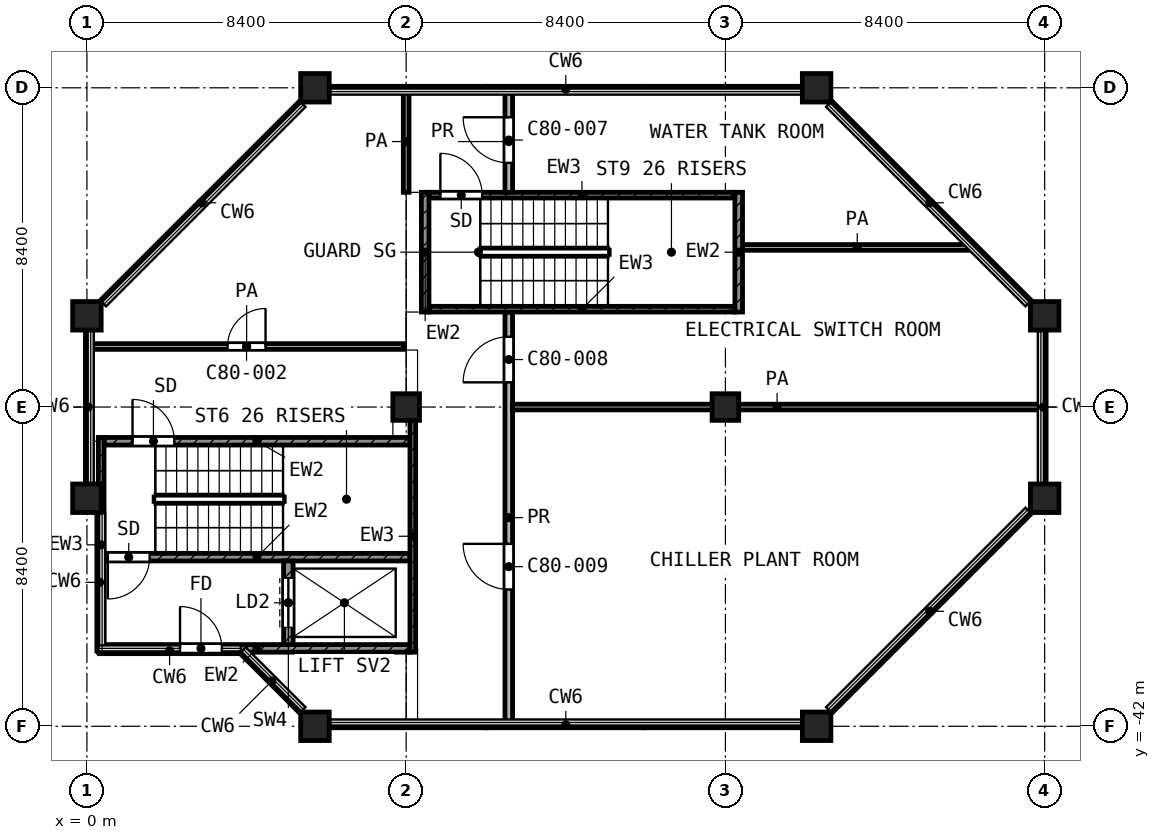
"""IFC4 building model, lengths in metres.
Left out: names, types, materials, properties, quantities, classifications, styles, units other than length and angle.
Written with IfcOpenShell. Run it as: python <this file> out.ifc"""

import sys

from ifc_helpers import new_model, si_unit, direction, frame, frame_2d, origin, origin_2d, place, context, subcontext, project, spatial, rectangle, extrude, element, fill, save


model = new_model("IFC4")
c1 = context("Model", 3, precision=1e-05, world=origin(), true_north=direction((0.0, 1.0)))
c2 = subcontext(c1, "Body", "Model", "MODEL_VIEW")
j1 = project(units=[si_unit("LENGTHUNIT", "METRE"), si_unit("PLANEANGLEUNIT", "RADIAN")], contexts=[c1])
p1 = place(None, origin())
s1 = spatial("IfcSite", under=j1, at=p1, CompositionType="ELEMENT")
p2 = place(p1, origin())
s2 = spatial("IfcBuilding", under=s1, at=p2, CompositionType="ELEMENT")
p3 = place(p2, frame((0.0, 0.0, 345.7)))
s3 = spatial("IfcBuildingStorey", under=s2, at=p3, CompositionType="ELEMENT", Elevation=345.7)
for number, where, z_axis, x_axis in (
    (1, (6.0, -25.2, 0.0), (0.0, 0.0, 1.0), (1.0, 0.0, 0.0)),
    (2, (19.2, -25.2, 0.0), (0.0, 0.0, 1.0), (1.0, 0.0, 0.0)),
    (3, (0.0, -31.2, 0.0), (0.0, 0.0, 1.0), (1.0, 0.0, 0.0)),
    (4, (25.2, -31.2, 0.0), (0.0, 0.0, 1.0), (1.0, 0.0, 0.0)),
):
    element("IfcColumn", number, at=place(p3, frame(where, z_axis=z_axis, x_axis=x_axis)), inside=s3, PredefinedType="COLUMN", context=c2, shape_type="SweptSolid", body=[
        extrude(rectangle(XDim=0.75, YDim=0.75, at=origin_2d()), origin(), (0.0, 0.0, 1.0), 4.5),
    ])
for number, where, z_axis, x_axis in (
    (5, (8.4, -33.6, 0.0), (0.0, 0.0, 1.0), (1.0, 0.0, 0.0)),
    (6, (16.8, -33.6, 0.0), (0.0, 0.0, 1.0), (1.0, 0.0, 0.0)),
):
    element("IfcColumn", number, at=place(p3, frame(where, z_axis=z_axis, x_axis=x_axis)), inside=s3, PredefinedType="COLUMN", context=c2, shape_type="SweptSolid", body=[
        extrude(rectangle(XDim=0.7, YDim=0.7, at=origin_2d()), origin(), (0.0, 0.0, 1.0), 4.5),
    ])
for number, where, z_axis, x_axis in (
    (7, (0.0, -36.0, 0.0), (0.0, 0.0, 1.0), (1.0, 0.0, 0.0)),
    (8, (25.2, -36.0, 0.0), (0.0, 0.0, 1.0), (1.0, 0.0, 0.0)),
    (9, (6.0, -42.0, 0.0), (0.0, 0.0, 1.0), (1.0, 0.0, 0.0)),
    (10, (19.2, -42.0, 0.0), (0.0, 0.0, 1.0), (1.0, 0.0, 0.0)),
):
    element("IfcColumn", number, at=place(p3, frame(where, z_axis=z_axis, x_axis=x_axis)), inside=s3, PredefinedType="COLUMN", context=c2, shape_type="SweptSolid", body=[
        extrude(rectangle(XDim=0.75, YDim=0.75, at=origin_2d()), origin(), (0.0, 0.0, 1.0), 4.5),
    ])
p4 = place(p3, frame((0.375, -40.05, 0.0), z_axis=(0.0, 0.0, 1.0), x_axis=(0.0, 1.0, 0.0)))
e11 = element("IfcWall", 11, at=p4, inside=s3, PredefinedType="SHEAR", context=c2, shape_type="SweptSolid", body=[
    extrude(rectangle(XDim=5.65, YDim=0.15, at=frame_2d((2.825, 0.0))), origin(), (0.0, 0.0, 1.0), 4.2),
])
p5 = place(p3, frame((8.575, -40.05, 0.0), z_axis=(0.0, 0.0, 1.0), x_axis=(0.0, 1.0, 0.0)))
e12 = element("IfcWall", 12, at=p5, inside=s3, PredefinedType="SHEAR", context=c2, shape_type="SweptSolid", body=[
    extrude(rectangle(XDim=6.1, YDim=0.15, at=frame_2d((3.05, 0.0))), origin(), (0.0, 0.0, 1.0), 4.2),
])
p6 = place(p3, frame((0.45, -34.5, 0.0), z_axis=(0.0, 0.0, 1.0), x_axis=(1.0, 0.0, 0.0)))
e13 = element("IfcWall", 13, at=p6, inside=s3, PredefinedType="SHEAR", context=c2, shape_type="SweptSolid", body=[
    extrude(rectangle(XDim=8.05, YDim=0.2, at=frame_2d((4.025, 0.0))), origin(), (0.0, 0.0, 1.0), 4.2),
])
p7 = place(p6, frame((0.75, 0.0, 0.0)))
e14 = element("IfcOpeningElement", 14, at=p7, cuts=e13, PredefinedType="OPENING", context=c2, shape_type="SweptSolid", body=[
    extrude(rectangle(XDim=1.1, YDim=2.1, at=frame_2d((0.55, 1.05))), frame((0.0, 0.11, 0.0), z_axis=(0.0, -1.0, 0.0), x_axis=(1.0, 0.0, 0.0)), (0.0, 0.0, 1.0), 0.22),
])
p8 = place(p3, frame((0.45, -37.55, 0.0), z_axis=(0.0, 0.0, 1.0), x_axis=(1.0, 0.0, 0.0)))
e15 = element("IfcWall", 15, at=p8, inside=s3, PredefinedType="SHEAR", context=c2, shape_type="SweptSolid", body=[
    extrude(rectangle(XDim=8.05, YDim=0.2, at=frame_2d((4.025, 0.0))), origin(), (0.0, 0.0, 1.0), 4.2),
])
p9 = place(p8, frame((0.1, 0.0, 0.0)))
e16 = element("IfcOpeningElement", 16, at=p9, cuts=e15, PredefinedType="OPENING", context=c2, shape_type="SweptSolid", body=[
    extrude(rectangle(XDim=1.1, YDim=2.1, at=frame_2d((0.55, 1.05))), frame((0.0, 0.11, 0.0), z_axis=(0.0, -1.0, 0.0), x_axis=(1.0, 0.0, 0.0)), (0.0, 0.0, 1.0), 0.22),
])
p10 = place(p3, frame((0.45, -39.95, 0.0), z_axis=(0.0, 0.0, 1.0), x_axis=(1.0, 0.0, 0.0)))
e17 = element("IfcWall", 17, at=p10, inside=s3, PredefinedType="SHEAR", context=c2, shape_type="SweptSolid", body=[
    extrude(rectangle(XDim=8.05, YDim=0.2, at=frame_2d((4.025, 0.0))), origin(), (0.0, 0.0, 1.0), 4.2),
])
p11 = place(p10, frame((2.0, 0.0, 0.0)))
e18 = element("IfcOpeningElement", 18, at=p11, cuts=e17, PredefinedType="OPENING", context=c2, shape_type="SweptSolid", body=[
    extrude(rectangle(XDim=1.1, YDim=2.1, at=frame_2d((0.55, 1.05))), frame((0.0, 0.11, 0.0), z_axis=(0.0, -1.0, 0.0), x_axis=(1.0, 0.0, 0.0)), (0.0, 0.0, 1.0), 0.22),
])
p12 = place(p3, frame((5.3, -39.85, 0.0), z_axis=(0.0, 0.0, 1.0), x_axis=(0.0, 1.0, 0.0)))
e19 = element("IfcWall", 19, at=p12, inside=s3, PredefinedType="SHEAR", context=c2, shape_type="SweptSolid", body=[
    extrude(rectangle(XDim=2.2, YDim=0.25, at=frame_2d((1.1, 0.0))), origin(), (0.0, 0.0, 1.0), 4.2),
])
p13 = place(p12, frame((0.45, 0.0, 0.0)))
e20 = element("IfcOpeningElement", 20, at=p13, cuts=e19, PredefinedType="OPENING", context=c2, shape_type="SweptSolid", body=[
    extrude(rectangle(XDim=1.3, YDim=2.1, at=frame_2d((0.65, 1.05))), frame((0.0, 0.135, 0.0), z_axis=(0.0, -1.0, 0.0), x_axis=(1.0, 0.0, 0.0)), (0.0, 0.0, 1.0), 0.27),
])
for number, where, z_axis, x_axis in (
    (21, (8.9, -31.1, 0.0), (0.0, 0.0, 1.0), (0.0, 1.0, 0.0)),
    (22, (17.15, -31.1, 0.0), (0.0, 0.0, 1.0), (0.0, 1.0, 0.0)),
):
    element("IfcWall", number, at=place(p3, frame(where, z_axis=z_axis, x_axis=x_axis)), inside=s3, PredefinedType="SHEAR", context=c2, shape_type="SweptSolid", body=[
        extrude(rectangle(XDim=3.15, YDim=0.2, at=frame_2d((1.575, 0.0))), origin(), (0.0, 0.0, 1.0), 4.2),
    ])
p14 = place(p3, frame((9.0, -28.025, 0.0), z_axis=(0.0, 0.0, 1.0), x_axis=(1.0, 0.0, 0.0)))
e23 = element("IfcWall", 23, at=p14, inside=s3, PredefinedType="SHEAR", context=c2, shape_type="SweptSolid", body=[
    extrude(rectangle(XDim=8.05, YDim=0.15, at=frame_2d((4.025, 0.0))), origin(), (0.0, 0.0, 1.0), 4.2),
])
p15 = place(p14, frame((0.3, 0.0, 0.0)))
e24 = element("IfcOpeningElement", 24, at=p15, cuts=e23, PredefinedType="OPENING", context=c2, shape_type="SweptSolid", body=[
    extrude(rectangle(XDim=1.1, YDim=2.1, at=frame_2d((0.55, 1.05))), frame((0.0, 0.085, 0.0), z_axis=(0.0, -1.0, 0.0), x_axis=(1.0, 0.0, 0.0)), (0.0, 0.0, 1.0), 0.17),
])
p16 = place(p3, frame((9.0, -31.025, 0.0), z_axis=(0.0, 0.0, 1.0), x_axis=(1.0, 0.0, 0.0)))
e25 = element("IfcWall", 25, at=p16, inside=s3, PredefinedType="SHEAR", context=c2, shape_type="SweptSolid", body=[
    extrude(rectangle(XDim=8.05, YDim=0.15, at=frame_2d((4.025, 0.0))), origin(), (0.0, 0.0, 1.0), 4.2),
])
p17 = place(p3, frame((11.2, -33.6, 0.0), z_axis=(0.0, 0.0, 1.0), x_axis=(1.0, 0.0, 0.0)))
e26 = element("IfcWall", 26, at=p17, inside=s3, PredefinedType="PARTITIONING", context=c2, shape_type="SweptSolid", body=[
    extrude(rectangle(XDim=13.92, YDim=0.15, at=frame_2d((6.96, 0.0))), origin(), (0.0, 0.0, 1.0), 4.2),
])
p18 = place(p3, frame((0.08, -32.007, 0.0), z_axis=(0.0, 0.0, 1.0), x_axis=(1.0, 0.0, 0.0)))
e27 = element("IfcWall", 27, at=p18, inside=s3, PredefinedType="PARTITIONING", context=c2, shape_type="SweptSolid", body=[
    extrude(rectangle(XDim=8.245, YDim=0.15, at=frame_2d((4.123, 0.0))), origin(), (0.0, 0.0, 1.0), 4.2),
])
p19 = place(p18, frame((3.62, 0.0, 0.0)))
e28 = element("IfcOpeningElement", 28, at=p19, cuts=e27, PredefinedType="OPENING", context=c2, shape_type="SweptSolid", body=[
    extrude(rectangle(XDim=1.0, YDim=2.1, at=frame_2d((0.5, 1.05))), frame((0.0, 0.085, 0.0), z_axis=(0.0, -1.0, 0.0), x_axis=(1.0, 0.0, 0.0)), (0.0, 0.0, 1.0), 0.17),
])
p20 = place(p3, frame((17.25, -29.4, 0.0), z_axis=(0.0, 0.0, 1.0), x_axis=(1.0, 0.0, 0.0)))
e29 = element("IfcWall", 29, at=p20, inside=s3, PredefinedType="PARTITIONING", context=c2, shape_type="SweptSolid", body=[
    extrude(rectangle(XDim=6.037, YDim=0.15, at=frame_2d((3.019, 0.0))), origin(), (0.0, 0.0, 1.0), 4.2),
])
p21 = place(p3, frame((8.4, -27.95, 0.0), z_axis=(0.0, 0.0, 1.0), x_axis=(0.0, 1.0, 0.0)))
e30 = element("IfcWall", 30, at=p21, inside=s3, PredefinedType="PARTITIONING", context=c2, shape_type="SweptSolid", body=[
    extrude(rectangle(XDim=2.67, YDim=0.15, at=frame_2d((1.335, 0.0))), origin(), (0.0, 0.0, 1.0), 4.2),
])
p22 = place(p3, frame((11.1, -41.92, 0.0), z_axis=(0.0, 0.0, 1.0), x_axis=(0.0, 1.0, 0.0)))
e31 = element("IfcWall", 31, at=p22, inside=s3, PredefinedType="PARTITIONING", context=c2, shape_type="SweptSolid", body=[
    extrude(rectangle(XDim=10.82, YDim=0.2, at=frame_2d((5.41, 0.0))), origin(), (0.0, 0.0, 1.0), 4.2),
])
p23 = place(p22, frame((8.97, 0.0, 0.0)))
e32 = element("IfcOpeningElement", 32, at=p23, cuts=e31, PredefinedType="OPENING", context=c2, shape_type="SweptSolid", body=[
    extrude(rectangle(XDim=1.2, YDim=2.1, at=frame_2d((0.6, 1.05))), frame((0.0, 0.11, 0.0), z_axis=(0.0, -1.0, 0.0), x_axis=(1.0, 0.0, 0.0)), (0.0, 0.0, 1.0), 0.22),
])
p24 = place(p22, frame((3.52, 0.0, 0.0)))
e33 = element("IfcOpeningElement", 33, at=p24, cuts=e31, PredefinedType="OPENING", context=c2, shape_type="SweptSolid", body=[
    extrude(rectangle(XDim=1.2, YDim=2.1, at=frame_2d((0.6, 1.05))), frame((0.0, 0.11, 0.0), z_axis=(0.0, -1.0, 0.0), x_axis=(1.0, 0.0, 0.0)), (0.0, 0.0, 1.0), 0.22),
])
p25 = place(p3, frame((11.1, -27.95, 0.0), z_axis=(0.0, 0.0, 1.0), x_axis=(0.0, 1.0, 0.0)))
e34 = element("IfcWall", 34, at=p25, inside=s3, PredefinedType="PARTITIONING", context=c2, shape_type="SweptSolid", body=[
    extrude(rectangle(XDim=2.67, YDim=0.2, at=frame_2d((1.335, 0.0))), origin(), (0.0, 0.0, 1.0), 4.2),
])
p26 = place(p25, frame((0.775, 0.0, 0.0)))
e35 = element("IfcOpeningElement", 35, at=p26, cuts=e34, PredefinedType="OPENING", context=c2, shape_type="SweptSolid", body=[
    extrude(rectangle(XDim=1.2, YDim=2.1, at=frame_2d((0.6, 1.05))), frame((0.0, 0.11, 0.0), z_axis=(0.0, -1.0, 0.0), x_axis=(1.0, 0.0, 0.0)), (0.0, 0.0, 1.0), 0.22),
])
p27 = place(p7, origin())
e36 = element("IfcDoor", 36, at=p27, inside=s3, OperationType="SINGLE_SWING_LEFT", PredefinedType="DOOR", context=c2, shape_type="SweptSolid", body=[
    extrude(rectangle(XDim=1.1, YDim=2.1, at=frame_2d((0.55, 1.05))), frame((0.0, 0.025, 0.0), z_axis=(0.0, -1.0, 0.0), x_axis=(1.0, 0.0, 0.0)), (0.0, 0.0, 1.0), 0.05),
])
fill(e14, e36)
p28 = place(p9, frame((1.1, 0.0, 0.0), z_axis=(0.0, 0.0, 1.0), x_axis=(-1.0, 0.0, 0.0)))
e37 = element("IfcDoor", 37, at=p28, inside=s3, OperationType="SINGLE_SWING_LEFT", PredefinedType="DOOR", context=c2, shape_type="SweptSolid", body=[
    extrude(rectangle(XDim=1.1, YDim=2.1, at=frame_2d((0.55, 1.05))), frame((0.0, 0.025, 0.0), z_axis=(0.0, -1.0, 0.0), x_axis=(1.0, 0.0, 0.0)), (0.0, 0.0, 1.0), 0.05),
])
fill(e16, e37)
p29 = place(p13, origin())
e38 = element("IfcDoor", 38, at=p29, inside=s3, OperationType="DOUBLE_DOOR_SLIDING", PredefinedType="DOOR", context=c2, shape_type="SweptSolid", body=[
    extrude(rectangle(XDim=1.3, YDim=2.1, at=frame_2d((0.65, 1.05))), frame((0.0, 0.025, 0.0), z_axis=(0.0, -1.0, 0.0), x_axis=(1.0, 0.0, 0.0)), (0.0, 0.0, 1.0), 0.05),
])
fill(e20, e38)
p30 = place(p11, origin())
e39 = element("IfcDoor", 39, at=p30, inside=s3, OperationType="SINGLE_SWING_LEFT", PredefinedType="DOOR", context=c2, shape_type="SweptSolid", body=[
    extrude(rectangle(XDim=1.1, YDim=2.1, at=frame_2d((0.55, 1.05))), frame((0.0, 0.025, 0.0), z_axis=(0.0, -1.0, 0.0), x_axis=(1.0, 0.0, 0.0)), (0.0, 0.0, 1.0), 0.05),
])
fill(e18, e39)
p31 = place(p15, origin())
e40 = element("IfcDoor", 40, at=p31, inside=s3, OperationType="SINGLE_SWING_LEFT", PredefinedType="DOOR", context=c2, shape_type="SweptSolid", body=[
    extrude(rectangle(XDim=1.1, YDim=2.1, at=frame_2d((0.55, 1.05))), frame((0.0, 0.025, 0.0), z_axis=(0.0, -1.0, 0.0), x_axis=(1.0, 0.0, 0.0)), (0.0, 0.0, 1.0), 0.05),
])
fill(e24, e40)
p32 = place(p26, origin())
e41 = element("IfcDoor", 41, at=p32, inside=s3, OperationType="SINGLE_SWING_RIGHT", PredefinedType="DOOR", context=c2, shape_type="SweptSolid", body=[
    extrude(rectangle(XDim=1.2, YDim=2.1, at=frame_2d((0.6, 1.05))), frame((0.0, 0.025, 0.0), z_axis=(0.0, -1.0, 0.0), x_axis=(1.0, 0.0, 0.0)), (0.0, 0.0, 1.0), 0.05),
])
fill(e35, e41)
p33 = place(p23, origin())
e42 = element("IfcDoor", 42, at=p33, inside=s3, OperationType="SINGLE_SWING_LEFT", PredefinedType="DOOR", context=c2, shape_type="SweptSolid", body=[
    extrude(rectangle(XDim=1.2, YDim=2.1, at=frame_2d((0.6, 1.05))), frame((0.0, 0.025, 0.0), z_axis=(0.0, -1.0, 0.0), x_axis=(1.0, 0.0, 0.0)), (0.0, 0.0, 1.0), 0.05),
])
fill(e32, e42)
p34 = place(p24, origin())
e43 = element("IfcDoor", 43, at=p34, inside=s3, OperationType="SINGLE_SWING_RIGHT", PredefinedType="DOOR", context=c2, shape_type="SweptSolid", body=[
    extrude(rectangle(XDim=1.2, YDim=2.1, at=frame_2d((0.6, 1.05))), frame((0.0, 0.025, 0.0), z_axis=(0.0, -1.0, 0.0), x_axis=(1.0, 0.0, 0.0)), (0.0, 0.0, 1.0), 0.05),
])
fill(e33, e43)
p35 = place(p19, origin())
e44 = element("IfcDoor", 44, at=p35, inside=s3, OperationType="SINGLE_SWING_RIGHT", PredefinedType="DOOR", context=c2, shape_type="SweptSolid", body=[
    extrude(rectangle(XDim=1.0, YDim=2.1, at=frame_2d((0.5, 1.05))), frame((0.0, 0.025, 0.0), z_axis=(0.0, -1.0, 0.0), x_axis=(1.0, 0.0, 0.0)), (0.0, 0.0, 1.0), 0.05),
])
fill(e28, e44)
save(model, sys.argv[1])
